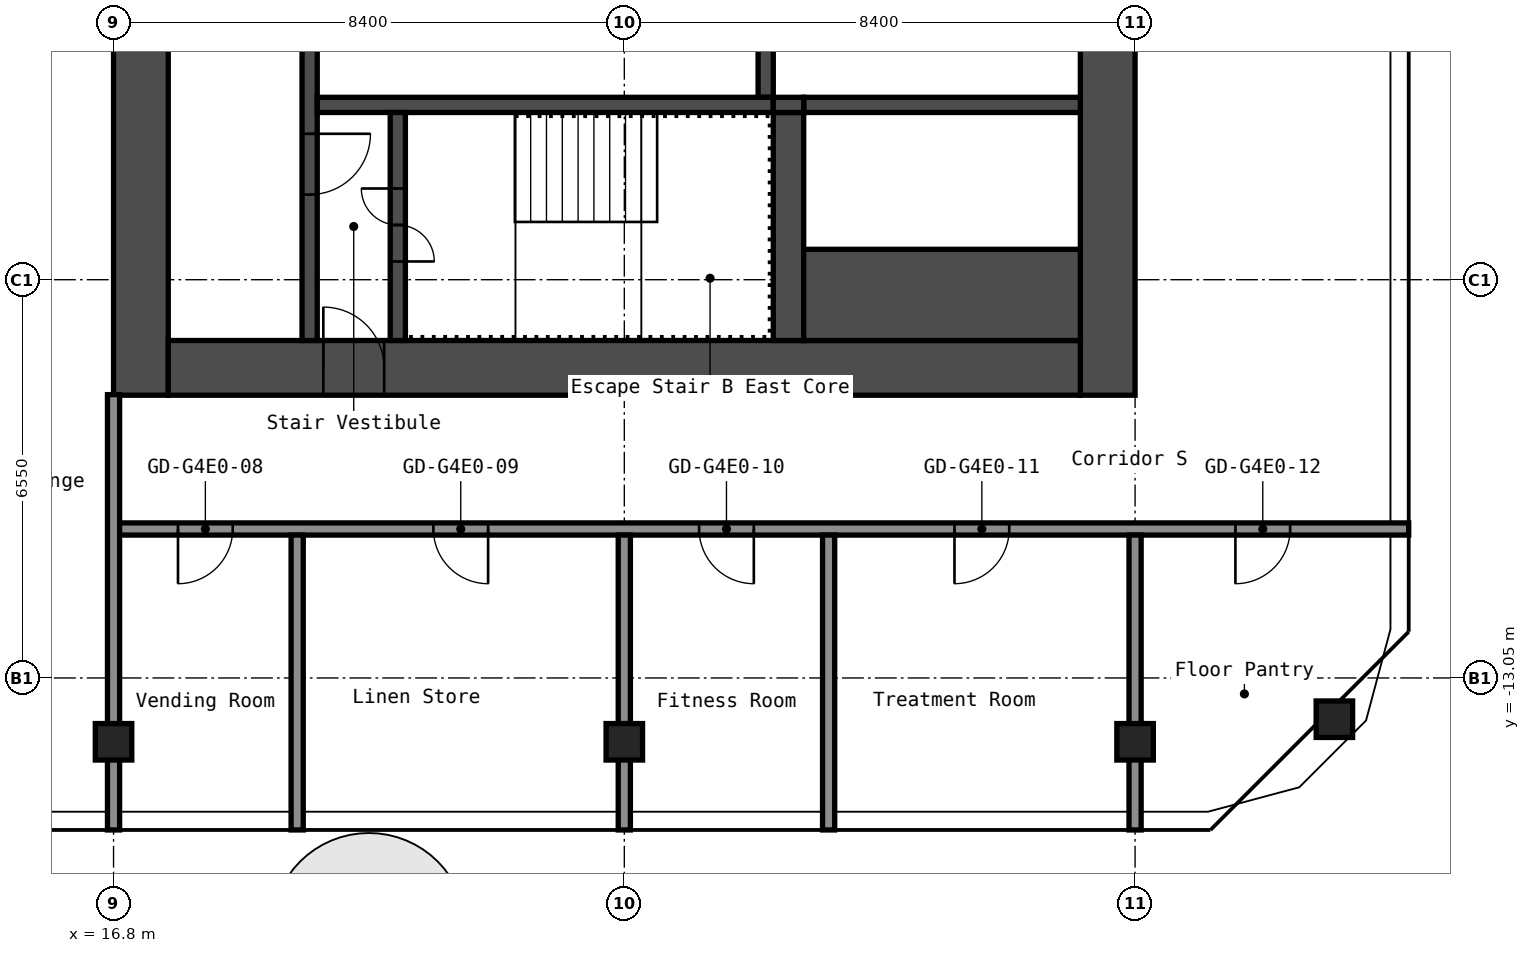
"""IFC4 building model, lengths in metres.
Left out: names, types, materials, properties, quantities, classifications, styles, units other than length and angle.
Written with IfcOpenShell. Run it as: python <this file> out.ifc"""

import sys

from ifc_helpers import new_model, si_unit, direction, frame, frame_2d, origin, origin_2d, place, context, subcontext, project, spatial, rectangle, hollow_rectangle, extrude, element, fill, save


model = new_model("IFC4")
c1 = context("Model", 3, precision=1e-05, world=origin(), true_north=direction((0.0, 1.0)))
c2 = subcontext(c1, "Body", "Model", "MODEL_VIEW")
j1 = project(units=[si_unit("LENGTHUNIT", "METRE"), si_unit("PLANEANGLEUNIT", "RADIAN")], contexts=[c1])
p1 = place(None, origin())
s1 = spatial("IfcSite", under=j1, at=p1, CompositionType="ELEMENT")
p2 = place(p1, origin())
s2 = spatial("IfcBuilding", under=s1, at=p2, CompositionType="ELEMENT")
p3 = place(p2, frame((0.0, 0.0, 199.4)))
s3 = spatial("IfcBuildingStorey", under=s2, at=p3, CompositionType="ELEMENT", Elevation=199.4)
for number, where, z_axis, x_axis in (
    (1, (16.8, -14.1, 0.0), (0.0, 0.0, 1.0), (1.0, 0.0, 0.0)),
    (2, (25.2, -14.1, 0.0), (0.0, 0.0, 1.0), (1.0, 0.0, 0.0)),
    (3, (33.6, -14.1, 0.0), (0.0, 0.0, 1.0), (1.0, 0.0, 0.0)),
    (4, (36.878, -13.729, 0.0), (0.0, 0.0, 1.0), (1.0, 0.0, 0.0)),
):
    element("IfcColumn", number, at=place(p3, frame(where, z_axis=z_axis, x_axis=x_axis)), inside=s3, PredefinedType="COLUMN", context=c2, shape_type="SweptSolid", body=[
        extrude(hollow_rectangle(XDim=0.6, YDim=0.6, WallThickness=0.025, InnerFilletRadius=0.038, OuterFilletRadius=0.062, at=origin_2d()), origin(), (0.0, 0.0, 1.0), 2.75),
    ])
p4 = place(p3, frame((17.25, -8.4, 0.0), z_axis=(0.0, 0.0, 1.0), x_axis=(0.0, 1.0, 0.0)))
e5 = element("IfcWall", 5, at=p4, inside=s3, PredefinedType="SHEAR", context=c2, shape_type="SweptSolid", body=[
    extrude(rectangle(XDim=16.8, YDim=0.9, at=frame_2d((8.4, 0.0))), origin(), (0.0, 0.0, 1.0), 2.75),
])
p5 = place(p4, frame((10.1, 0.0, 0.0)))
e6 = element("IfcOpeningElement", 6, at=p5, cuts=e5, PredefinedType="OPENING", context=c2, shape_type="SweptSolid", body=[
    extrude(rectangle(XDim=1.6, YDim=2.1, at=frame_2d((0.8, 1.05))), frame((0.0, 0.46, 0.0), z_axis=(0.0, -1.0, 0.0), x_axis=(1.0, 0.0, 0.0)), (0.0, 0.0, 1.0), 0.92),
])
p6 = place(p3, frame((33.15, -8.4, 0.0), z_axis=(0.0, 0.0, 1.0), x_axis=(0.0, 1.0, 0.0)))
e7 = element("IfcWall", 7, at=p6, inside=s3, PredefinedType="SHEAR", context=c2, shape_type="SweptSolid", body=[
    extrude(rectangle(XDim=16.8, YDim=0.9, at=frame_2d((8.4, 0.0))), origin(), (0.0, 0.0, 1.0), 2.75),
])
p7 = place(p3, frame((17.7, -7.95, 0.0), z_axis=(0.0, 0.0, 1.0), x_axis=(1.0, 0.0, 0.0)))
e8 = element("IfcWall", 8, at=p7, inside=s3, PredefinedType="SHEAR", context=c2, shape_type="SweptSolid", body=[
    extrude(rectangle(XDim=15.0, YDim=0.9, at=frame_2d((7.5, 0.0))), origin(), (0.0, 0.0, 1.0), 2.75),
])
p8 = place(p7, frame((2.55, 0.0, 0.0)))
e9 = element("IfcOpeningElement", 9, at=p8, cuts=e8, PredefinedType="OPENING", context=c2, shape_type="SweptSolid", body=[
    extrude(rectangle(XDim=1.0, YDim=2.1, at=frame_2d((0.5, 1.05))), frame((0.0, 0.46, 0.0), z_axis=(0.0, -1.0, 0.0), x_axis=(1.0, 0.0, 0.0)), (0.0, 0.0, 1.0), 0.92),
])
p9 = place(p3, frame((20.025, -7.5, 0.0), z_axis=(0.0, 0.0, 1.0), x_axis=(0.0, 1.0, 0.0)))
e10 = element("IfcWall", 10, at=p9, inside=s3, PredefinedType="SHEAR", context=c2, shape_type="SweptSolid", body=[
    extrude(rectangle(XDim=6.3, YDim=0.25, at=frame_2d((3.15, 0.0))), origin(), (0.0, 0.0, 1.0), 2.75),
])
p10 = place(p9, frame((2.4, 0.0, 0.0)))
e11 = element("IfcOpeningElement", 11, at=p10, cuts=e10, PredefinedType="OPENING", context=c2, shape_type="SweptSolid", body=[
    extrude(rectangle(XDim=1.0, YDim=2.1, at=frame_2d((0.5, 1.05))), frame((0.0, 0.135, 0.0), z_axis=(0.0, -1.0, 0.0), x_axis=(1.0, 0.0, 0.0)), (0.0, 0.0, 1.0), 0.27),
])
p11 = place(p3, frame((27.525, -3.5, 0.0), z_axis=(0.0, 0.0, 1.0), x_axis=(0.0, 1.0, 0.0)))
e12 = element("IfcWall", 12, at=p11, inside=s3, PredefinedType="SHEAR", context=c2, shape_type="SweptSolid", body=[
    extrude(rectangle(XDim=2.05, YDim=0.25, at=frame_2d((1.025, 0.0))), origin(), (0.0, 0.0, 1.0), 2.75),
])
p12 = place(p3, frame((20.15, -3.625, 0.0), z_axis=(0.0, 0.0, 1.0), x_axis=(1.0, 0.0, 0.0)))
e13 = element("IfcWall", 13, at=p12, inside=s3, PredefinedType="SHEAR", context=c2, shape_type="SweptSolid", body=[
    extrude(rectangle(XDim=7.5, YDim=0.25, at=frame_2d((3.75, 0.0))), origin(), (0.0, 0.0, 1.0), 2.75),
])
p13 = place(p3, frame((21.475, -7.5, 0.0), z_axis=(0.0, 0.0, 1.0), x_axis=(0.0, 1.0, 0.0)))
e14 = element("IfcWall", 14, at=p13, inside=s3, PredefinedType="SHEAR", context=c2, shape_type="SweptSolid", body=[
    extrude(rectangle(XDim=3.75, YDim=0.25, at=frame_2d((1.875, 0.0))), origin(), (0.0, 0.0, 1.0), 2.75),
])
p14 = place(p13, frame((1.3, 0.0, 0.0)))
e15 = element("IfcOpeningElement", 15, at=p14, cuts=e14, PredefinedType="OPENING", context=c2, shape_type="SweptSolid", body=[
    extrude(rectangle(XDim=1.2, YDim=2.1, at=frame_2d((0.6, 1.05))), frame((0.0, 0.135, 0.0), z_axis=(0.0, -1.0, 0.0), x_axis=(1.0, 0.0, 0.0)), (0.0, 0.0, 1.0), 0.27),
])
p15 = place(p3, frame((27.9, -7.5, 0.0), z_axis=(0.0, 0.0, 1.0), x_axis=(0.0, 1.0, 0.0)))
e16 = element("IfcWall", 16, at=p15, inside=s3, PredefinedType="SHEAR", context=c2, shape_type="SweptSolid", body=[
    extrude(rectangle(XDim=3.75, YDim=0.5, at=frame_2d((1.875, 0.0))), origin(), (0.0, 0.0, 1.0), 2.75),
])
p16 = place(p3, frame((28.15, -3.625, 0.0), z_axis=(0.0, 0.0, 1.0), x_axis=(1.0, 0.0, 0.0)))
e17 = element("IfcWall", 17, at=p16, inside=s3, PredefinedType="SHEAR", context=c2, shape_type="SweptSolid", body=[
    extrude(rectangle(XDim=4.55, YDim=0.25, at=frame_2d((2.275, 0.0))), origin(), (0.0, 0.0, 1.0), 2.75),
])
p17 = place(p3, frame((28.15, -6.75, 0.0), z_axis=(0.0, 0.0, 1.0), x_axis=(1.0, 0.0, 0.0)))
e18 = element("IfcWall", 18, at=p17, inside=s3, PredefinedType="SHEAR", context=c2, shape_type="SweptSolid", body=[
    extrude(rectangle(XDim=4.55, YDim=1.5, at=frame_2d((2.275, 0.0))), origin(), (0.0, 0.0, 1.0), 2.75),
])
p18 = place(p3, frame((27.65, -3.625, 0.0), z_axis=(0.0, 0.0, 1.0), x_axis=(1.0, 0.0, 0.0)))
e19 = element("IfcWall", 19, at=p18, inside=s3, PredefinedType="SHEAR", context=c2, shape_type="SweptSolid", body=[
    extrude(rectangle(XDim=0.5, YDim=0.25, at=frame_2d((0.25, 0.0))), origin(), (0.0, 0.0, 1.0), 2.75),
])
p19 = place(p3, frame((16.8, -10.6, 0.0), z_axis=(0.0, 0.0, 1.0), x_axis=(1.0, 0.0, 0.0)))
e20 = element("IfcWall", 20, at=p19, inside=s3, PredefinedType="PARTITIONING", context=c2, shape_type="SweptSolid", body=[
    extrude(rectangle(XDim=21.3, YDim=0.2, at=frame_2d((10.65, 0.0))), origin(), (0.0, 0.0, 1.0), 2.75),
])
p20 = place(p19, frame((1.06, 0.0, 0.0)))
e21 = element("IfcOpeningElement", 21, at=p20, cuts=e20, PredefinedType="OPENING", context=c2, shape_type="SweptSolid", body=[
    extrude(rectangle(XDim=0.9, YDim=2.1, at=frame_2d((0.45, 1.05))), frame((0.0, 0.11, 0.0), z_axis=(0.0, -1.0, 0.0), x_axis=(1.0, 0.0, 0.0)), (0.0, 0.0, 1.0), 0.22),
])
p21 = place(p19, frame((5.26, 0.0, 0.0)))
e22 = element("IfcOpeningElement", 22, at=p21, cuts=e20, PredefinedType="OPENING", context=c2, shape_type="SweptSolid", body=[
    extrude(rectangle(XDim=0.9, YDim=2.1, at=frame_2d((0.45, 1.05))), frame((0.0, 0.11, 0.0), z_axis=(0.0, -1.0, 0.0), x_axis=(1.0, 0.0, 0.0)), (0.0, 0.0, 1.0), 0.22),
])
p22 = place(p19, frame((9.63, 0.0, 0.0)))
e23 = element("IfcOpeningElement", 23, at=p22, cuts=e20, PredefinedType="OPENING", context=c2, shape_type="SweptSolid", body=[
    extrude(rectangle(XDim=0.9, YDim=2.1, at=frame_2d((0.45, 1.05))), frame((0.0, 0.11, 0.0), z_axis=(0.0, -1.0, 0.0), x_axis=(1.0, 0.0, 0.0)), (0.0, 0.0, 1.0), 0.22),
])
p23 = place(p19, frame((13.83, 0.0, 0.0)))
e24 = element("IfcOpeningElement", 24, at=p23, cuts=e20, PredefinedType="OPENING", context=c2, shape_type="SweptSolid", body=[
    extrude(rectangle(XDim=0.9, YDim=2.1, at=frame_2d((0.45, 1.05))), frame((0.0, 0.11, 0.0), z_axis=(0.0, -1.0, 0.0), x_axis=(1.0, 0.0, 0.0)), (0.0, 0.0, 1.0), 0.22),
])
p24 = place(p19, frame((18.45, 0.0, 0.0)))
e25 = element("IfcOpeningElement", 25, at=p24, cuts=e20, PredefinedType="OPENING", context=c2, shape_type="SweptSolid", body=[
    extrude(rectangle(XDim=0.9, YDim=2.1, at=frame_2d((0.45, 1.05))), frame((0.0, 0.11, 0.0), z_axis=(0.0, -1.0, 0.0), x_axis=(1.0, 0.0, 0.0)), (0.0, 0.0, 1.0), 0.22),
])
p25 = place(p3, frame((16.8, -15.55, 0.0), z_axis=(0.0, 0.0, 1.0), x_axis=(0.0, 1.0, 0.0)))
e26 = element("IfcWall", 26, at=p25, inside=s3, PredefinedType="PARTITIONING", context=c2, shape_type="SweptSolid", body=[
    extrude(rectangle(XDim=7.16, YDim=0.2, at=frame_2d((3.58, 0.0))), origin(), (0.0, 0.0, 1.0), 2.75),
])
for number, where, z_axis, x_axis in (
    (27, (19.82, -15.55, 0.0), (0.0, 0.0, 1.0), (0.0, 1.0, 0.0)),
    (28, (25.2, -15.55, 0.0), (0.0, 0.0, 1.0), (0.0, 1.0, 0.0)),
    (29, (28.56, -15.55, 0.0), (0.0, 0.0, 1.0), (0.0, 1.0, 0.0)),
    (30, (33.6, -15.55, 0.0), (0.0, 0.0, 1.0), (0.0, 1.0, 0.0)),
):
    element("IfcWall", number, at=place(p3, frame(where, z_axis=z_axis, x_axis=x_axis)), inside=s3, PredefinedType="PARTITIONING", context=c2, shape_type="SweptSolid", body=[
        extrude(rectangle(XDim=4.85, YDim=0.2, at=frame_2d((2.425, 0.0))), origin(), (0.0, 0.0, 1.0), 2.75),
    ])
p26 = place(p8, origin())
e31 = element("IfcDoor", 31, at=p26, inside=s3, OperationType="SINGLE_SWING_RIGHT", PredefinedType="DOOR", context=c2, shape_type="SweptSolid", body=[
    extrude(rectangle(XDim=1.0, YDim=2.1, at=frame_2d((0.5, 1.05))), frame((0.0, 0.025, 0.0), z_axis=(0.0, -1.0, 0.0), x_axis=(1.0, 0.0, 0.0)), (0.0, 0.0, 1.0), 0.05),
])
fill(e9, e31)
p27 = place(p14, origin())
e32 = element("IfcDoor", 32, at=p27, inside=s3, OperationType="DOUBLE_DOOR_SINGLE_SWING", PredefinedType="DOOR", context=c2, shape_type="SweptSolid", body=[
    extrude(rectangle(XDim=1.2, YDim=2.1, at=frame_2d((0.6, 1.05))), frame((0.0, 0.025, 0.0), z_axis=(0.0, -1.0, 0.0), x_axis=(1.0, 0.0, 0.0)), (0.0, 0.0, 1.0), 0.05),
])
fill(e15, e32)
p28 = place(p10, origin())
e33 = element("IfcDoor", 33, at=p28, inside=s3, OperationType="SINGLE_SWING_RIGHT", PredefinedType="DOOR", context=c2, shape_type="SweptSolid", body=[
    extrude(rectangle(XDim=1.0, YDim=2.1, at=frame_2d((0.5, 1.05))), frame((0.0, 0.025, 0.0), z_axis=(0.0, -1.0, 0.0), x_axis=(1.0, 0.0, 0.0)), (0.0, 0.0, 1.0), 0.05),
])
fill(e11, e33)
p29 = place(p20, origin())
e34 = element("IfcDoor", 34, at=p29, inside=s3, OperationType="SINGLE_SWING_LEFT", PredefinedType="DOOR", context=c2, shape_type="SweptSolid", body=[
    extrude(rectangle(XDim=0.9, YDim=2.1, at=frame_2d((0.45, 1.05))), frame((0.0, 0.025, 0.0), z_axis=(0.0, -1.0, 0.0), x_axis=(1.0, 0.0, 0.0)), (0.0, 0.0, 1.0), 0.05),
])
fill(e21, e34)
p30 = place(p21, origin())
e35 = element("IfcDoor", 35, at=p30, inside=s3, OperationType="SINGLE_SWING_RIGHT", PredefinedType="DOOR", context=c2, shape_type="SweptSolid", body=[
    extrude(rectangle(XDim=0.9, YDim=2.1, at=frame_2d((0.45, 1.05))), frame((0.0, 0.025, 0.0), z_axis=(0.0, -1.0, 0.0), x_axis=(1.0, 0.0, 0.0)), (0.0, 0.0, 1.0), 0.05),
])
fill(e22, e35)
p31 = place(p22, origin())
e36 = element("IfcDoor", 36, at=p31, inside=s3, OperationType="SINGLE_SWING_RIGHT", PredefinedType="DOOR", context=c2, shape_type="SweptSolid", body=[
    extrude(rectangle(XDim=0.9, YDim=2.1, at=frame_2d((0.45, 1.05))), frame((0.0, 0.025, 0.0), z_axis=(0.0, -1.0, 0.0), x_axis=(1.0, 0.0, 0.0)), (0.0, 0.0, 1.0), 0.05),
])
fill(e23, e36)
p32 = place(p23, origin())
e37 = element("IfcDoor", 37, at=p32, inside=s3, OperationType="SINGLE_SWING_LEFT", PredefinedType="DOOR", context=c2, shape_type="SweptSolid", body=[
    extrude(rectangle(XDim=0.9, YDim=2.1, at=frame_2d((0.45, 1.05))), frame((0.0, 0.025, 0.0), z_axis=(0.0, -1.0, 0.0), x_axis=(1.0, 0.0, 0.0)), (0.0, 0.0, 1.0), 0.05),
])
fill(e24, e37)
p33 = place(p24, origin())
e38 = element("IfcDoor", 38, at=p33, inside=s3, OperationType="SINGLE_SWING_LEFT", PredefinedType="DOOR", context=c2, shape_type="SweptSolid", body=[
    extrude(rectangle(XDim=0.9, YDim=2.1, at=frame_2d((0.45, 1.05))), frame((0.0, 0.025, 0.0), z_axis=(0.0, -1.0, 0.0), x_axis=(1.0, 0.0, 0.0)), (0.0, 0.0, 1.0), 0.05),
])
fill(e25, e38)
save(model, sys.argv[1])
